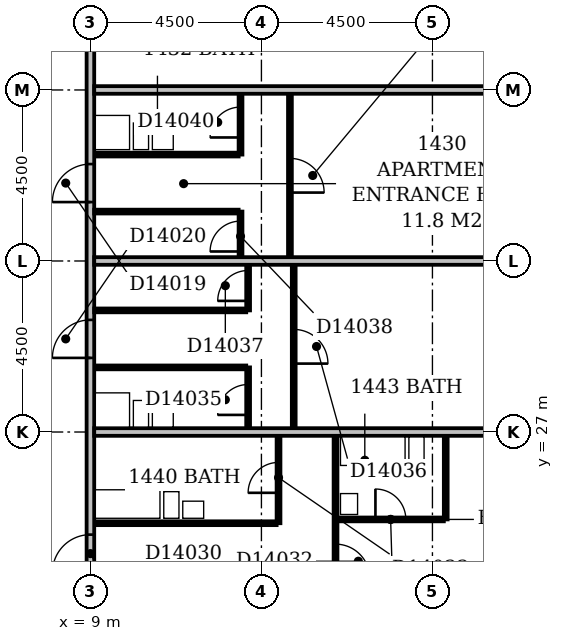
"""IFC4 building model, lengths in metres.
Left out: names, types, materials, properties, quantities, classifications, styles, units other than length and angle.
Written with IfcOpenShell. Run it as: python <this file> out.ifc"""

import sys

from ifc_helpers import new_model, si_unit, direction, frame, frame_2d, origin, place, context, subcontext, project, spatial, rectangle, extrude, element, fill, save


model = new_model("IFC4")
c1 = context("Model", 3, precision=1e-05, world=origin(), true_north=direction((0.0, 1.0)))
c2 = subcontext(c1, "Body", "Model", "MODEL_VIEW")
j1 = project(units=[si_unit("LENGTHUNIT", "METRE"), si_unit("PLANEANGLEUNIT", "RADIAN")], contexts=[c1])
p1 = place(None, origin())
s1 = spatial("IfcSite", under=j1, at=p1, CompositionType="ELEMENT")
p2 = place(p1, origin())
s2 = spatial("IfcBuilding", under=s1, at=p2, CompositionType="ELEMENT")
p3 = place(p2, frame((0.0, 0.0, 61.4)))
s3 = spatial("IfcBuildingStorey", under=s2, at=p3, CompositionType="ELEMENT", Elevation=61.4)
p4 = place(p3, frame((9.0, 5.0, 0.0), z_axis=(0.0, 0.0, 1.0), x_axis=(0.0, 1.0, 0.0)))
e1 = element("IfcWall", 1, at=p4, inside=s3, PredefinedType="PARTITIONING", context=c2, shape_type="SweptSolid", body=[
    extrude(rectangle(XDim=44.5, YDim=0.2, at=frame_2d((22.25, 0.0))), origin(), (0.0, 0.0, 1.0), 3.3),
])
p5 = place(p4, frame((28.05, 0.0, 0.0)))
e2 = element("IfcOpeningElement", 2, at=p5, cuts=e1, PredefinedType="OPENING", context=c2, shape_type="SweptSolid", body=[
    extrude(rectangle(XDim=1.0, YDim=2.1, at=frame_2d((0.5, 1.05))), frame((0.0, 0.112, 0.0), z_axis=(0.0, -1.0, 0.0), x_axis=(1.0, 0.0, 0.0)), (0.0, 0.0, 1.0), 0.224),
])
p6 = place(p4, frame((23.95, 0.0, 0.0)))
e3 = element("IfcOpeningElement", 3, at=p6, cuts=e1, PredefinedType="OPENING", context=c2, shape_type="SweptSolid", body=[
    extrude(rectangle(XDim=1.0, YDim=2.1, at=frame_2d((0.5, 1.05))), frame((0.0, 0.112, 0.0), z_axis=(0.0, -1.0, 0.0), x_axis=(1.0, 0.0, 0.0)), (0.0, 0.0, 1.0), 0.224),
])
p7 = place(p4, frame((18.3, 0.0, 0.0)))
e4 = element("IfcOpeningElement", 4, at=p7, cuts=e1, PredefinedType="OPENING", context=c2, shape_type="SweptSolid", body=[
    extrude(rectangle(XDim=1.0, YDim=2.1, at=frame_2d((0.5, 1.05))), frame((0.0, 0.112, 0.0), z_axis=(0.0, -1.0, 0.0), x_axis=(1.0, 0.0, 0.0)), (0.0, 0.0, 1.0), 0.224),
])
p8 = place(p4, frame((9.3, 0.0, 0.0)))
e5 = element("IfcOpeningElement", 5, at=p8, cuts=e1, PredefinedType="OPENING", context=c2, shape_type="SweptSolid", body=[
    extrude(rectangle(XDim=1.0, YDim=2.1, at=frame_2d((0.5, 1.05))), frame((0.0, 0.112, 0.0), z_axis=(0.0, -1.0, 0.0), x_axis=(1.0, 0.0, 0.0)), (0.0, 0.0, 1.0), 0.224),
])
p9 = place(p4, frame((32.75, 0.0, 0.0)))
e6 = element("IfcOpeningElement", 6, at=p9, cuts=e1, PredefinedType="OPENING", context=c2, shape_type="SweptSolid", body=[
    extrude(rectangle(XDim=0.9, YDim=2.1, at=frame_2d((0.45, 1.05))), frame((0.0, 0.112, 0.0), z_axis=(0.0, -1.0, 0.0), x_axis=(1.0, 0.0, 0.0)), (0.0, 0.0, 1.0), 0.224),
])
p10 = place(p4, frame((1.5, 0.0, 0.0)))
e7 = element("IfcOpeningElement", 7, at=p10, cuts=e1, PredefinedType="OPENING", context=c2, shape_type="SweptSolid", body=[
    extrude(rectangle(XDim=0.9, YDim=2.1, at=frame_2d((0.45, 1.05))), frame((0.0, 0.112, 0.0), z_axis=(0.0, -1.0, 0.0), x_axis=(1.0, 0.0, 0.0)), (0.0, 0.0, 1.0), 0.224),
])
p11 = place(p3, frame((15.45, 18.1, 0.0), z_axis=(0.0, 0.0, 1.0), x_axis=(0.0, 1.0, 0.0)))
e8 = element("IfcWall", 8, at=p11, inside=s3, PredefinedType="PARTITIONING", context=c2, shape_type="SweptSolid", body=[
    extrude(rectangle(XDim=8.8, YDim=0.1, at=frame_2d((4.4, 0.0))), origin(), (0.0, 0.0, 1.0), 3.3),
])
p12 = place(p11, frame((1.7, 0.0, 0.0)))
e9 = element("IfcOpeningElement", 9, at=p12, cuts=e8, PredefinedType="OPENING", context=c2, shape_type="SweptSolid", body=[
    extrude(rectangle(XDim=0.9, YDim=2.1, at=frame_2d((0.45, 1.05))), frame((0.0, 0.062, 0.0), z_axis=(0.0, -1.0, 0.0), x_axis=(1.0, 0.0, 0.0)), (0.0, 0.0, 1.0), 0.124),
])
p13 = place(p11, frame((5.05, 0.0, 0.0)))
e10 = element("IfcOpeningElement", 10, at=p13, cuts=e8, PredefinedType="OPENING", context=c2, shape_type="SweptSolid", body=[
    extrude(rectangle(XDim=0.9, YDim=2.1, at=frame_2d((0.45, 1.05))), frame((0.0, 0.062, 0.0), z_axis=(0.0, -1.0, 0.0), x_axis=(1.0, 0.0, 0.0)), (0.0, 0.0, 1.0), 0.124),
])
p14 = place(p3, frame((9.1, 24.6, 0.0), z_axis=(0.0, 0.0, 1.0), x_axis=(1.0, 0.0, 0.0)))
e11 = element("IfcWall", 11, at=p14, inside=s3, PredefinedType="PLUMBINGWALL", context=c2, shape_type="SweptSolid", body=[
    extrude(rectangle(XDim=4.8, YDim=0.1, at=frame_2d((2.4, 0.0))), origin(), (0.0, 0.0, 1.0), 3.3),
])
p15 = place(p3, frame((13.95, 24.6, 0.0), z_axis=(0.0, 0.0, 1.0), x_axis=(0.0, 1.0, 0.0)))
e12 = element("IfcWall", 12, at=p15, inside=s3, PredefinedType="PARTITIONING", context=c2, shape_type="SweptSolid", body=[
    extrude(rectangle(XDim=2.3, YDim=0.1, at=frame_2d((1.15, 0.0))), origin(), (0.0, 0.0, 1.0), 3.3),
])
p16 = place(p15, frame((0.8, 0.0, 0.0)))
e13 = element("IfcOpeningElement", 13, at=p16, cuts=e12, PredefinedType="OPENING", context=c2, shape_type="SweptSolid", body=[
    extrude(rectangle(XDim=0.8, YDim=2.1, at=frame_2d((0.4, 1.05))), frame((0.0, 0.062, 0.0), z_axis=(0.0, -1.0, 0.0), x_axis=(1.0, 0.0, 0.0)), (0.0, 0.0, 1.0), 0.124),
])
p17 = place(p3, frame((15.5, 24.7, 0.0), z_axis=(0.0, 0.0, 1.0), x_axis=(1.0, 0.0, 0.0)))
e14 = element("IfcWall", 14, at=p17, inside=s3, PredefinedType="PLUMBINGWALL", context=c2, shape_type="SweptSolid", body=[
    extrude(rectangle(XDim=2.8, YDim=0.1, at=frame_2d((1.4, 0.0))), origin(), (0.0, 0.0, 1.0), 3.3),
])
p18 = place(p17, frame((1.0, 0.0, 0.0)))
e15 = element("IfcOpeningElement", 15, at=p18, cuts=e14, PredefinedType="OPENING", context=c2, shape_type="SweptSolid", body=[
    extrude(rectangle(XDim=0.8, YDim=2.1, at=frame_2d((0.4, 1.05))), frame((0.0, 0.062, 0.0), z_axis=(0.0, -1.0, 0.0), x_axis=(1.0, 0.0, 0.0)), (0.0, 0.0, 1.0), 0.124),
])
p19 = place(p3, frame((18.35, 24.7, 0.0), z_axis=(0.0, 0.0, 1.0), x_axis=(0.0, 1.0, 0.0)))
e16 = element("IfcWall", 16, at=p19, inside=s3, PredefinedType="PLUMBINGWALL", context=c2, shape_type="SweptSolid", body=[
    extrude(rectangle(XDim=2.2, YDim=0.1, at=frame_2d((1.1, 0.0))), origin(), (0.0, 0.0, 1.0), 3.3),
])
p20 = place(p3, frame((9.1, 27.0, 0.0), z_axis=(0.0, 0.0, 1.0), x_axis=(1.0, 0.0, 0.0)))
e17 = element("IfcWall", 17, at=p20, inside=s3, PredefinedType="PARTITIONING", context=c2, shape_type="SweptSolid", body=[
    extrude(rectangle(XDim=12.8, YDim=0.2, at=frame_2d((6.4, 0.0))), origin(), (0.0, 0.0, 1.0), 2.7),
])
p21 = place(p3, frame((13.15, 27.1, 0.0), z_axis=(0.0, 0.0, 1.0), x_axis=(0.0, 1.0, 0.0)))
e18 = element("IfcWall", 18, at=p21, inside=s3, PredefinedType="PARTITIONING", context=c2, shape_type="SweptSolid", body=[
    extrude(rectangle(XDim=1.6, YDim=0.1, at=frame_2d((0.8, 0.0))), origin(), (0.0, 0.0, 1.0), 3.3),
])
p22 = place(p21, frame((0.35, 0.0, 0.0)))
e19 = element("IfcOpeningElement", 19, at=p22, cuts=e18, PredefinedType="OPENING", context=c2, shape_type="SweptSolid", body=[
    extrude(rectangle(XDim=0.8, YDim=2.1, at=frame_2d((0.4, 1.05))), frame((0.0, 0.062, 0.0), z_axis=(0.0, -1.0, 0.0), x_axis=(1.0, 0.0, 0.0)), (0.0, 0.0, 1.0), 0.124),
])
p23 = place(p3, frame((14.35, 27.1, 0.0), z_axis=(0.0, 0.0, 1.0), x_axis=(0.0, 1.0, 0.0)))
e20 = element("IfcWall", 20, at=p23, inside=s3, PredefinedType="PARTITIONING", context=c2, shape_type="SweptSolid", body=[
    extrude(rectangle(XDim=4.3, YDim=0.1, at=frame_2d((2.15, 0.0))), origin(), (0.0, 0.0, 1.0), 3.3),
])
p24 = place(p23, frame((1.7, 0.0, 0.0)))
e21 = element("IfcOpeningElement", 21, at=p24, cuts=e20, PredefinedType="OPENING", context=c2, shape_type="SweptSolid", body=[
    extrude(rectangle(XDim=0.9, YDim=2.1, at=frame_2d((0.45, 1.05))), frame((0.0, 0.062, 0.0), z_axis=(0.0, -1.0, 0.0), x_axis=(1.0, 0.0, 0.0)), (0.0, 0.0, 1.0), 0.124),
])
p25 = place(p3, frame((9.1, 28.7, 0.0), z_axis=(0.0, 0.0, 1.0), x_axis=(1.0, 0.0, 0.0)))
e22 = element("IfcWall", 22, at=p25, inside=s3, PredefinedType="PLUMBINGWALL", context=c2, shape_type="SweptSolid", body=[
    extrude(rectangle(XDim=4.0, YDim=0.1, at=frame_2d((2.0, 0.0))), origin(), (0.0, 0.0, 1.0), 3.3),
])
p26 = place(p3, frame((9.1, 30.2, 0.0), z_axis=(0.0, 0.0, 1.0), x_axis=(1.0, 0.0, 0.0)))
e23 = element("IfcWall", 23, at=p26, inside=s3, PredefinedType="PARTITIONING", context=c2, shape_type="SweptSolid", body=[
    extrude(rectangle(XDim=4.0, YDim=0.1, at=frame_2d((2.0, 0.0))), origin(), (0.0, 0.0, 1.0), 3.3),
])
p27 = place(p3, frame((13.15, 30.2, 0.0), z_axis=(0.0, 0.0, 1.0), x_axis=(0.0, 1.0, 0.0)))
e24 = element("IfcWall", 24, at=p27, inside=s3, PredefinedType="PARTITIONING", context=c2, shape_type="SweptSolid", body=[
    extrude(rectangle(XDim=1.2, YDim=0.1, at=frame_2d((0.6, 0.0))), origin(), (0.0, 0.0, 1.0), 3.3),
])
p28 = place(p27, frame((0.25, 0.0, 0.0)))
e25 = element("IfcOpeningElement", 25, at=p28, cuts=e24, PredefinedType="OPENING", context=c2, shape_type="SweptSolid", body=[
    extrude(rectangle(XDim=0.8, YDim=2.1, at=frame_2d((0.4, 1.05))), frame((0.0, 0.062, 0.0), z_axis=(0.0, -1.0, 0.0), x_axis=(1.0, 0.0, 0.0)), (0.0, 0.0, 1.0), 0.124),
])
p29 = place(p3, frame((9.1, 31.5, 0.0), z_axis=(0.0, 0.0, 1.0), x_axis=(1.0, 0.0, 0.0)))
e26 = element("IfcWall", 26, at=p29, inside=s3, PredefinedType="PARTITIONING", context=c2, shape_type="SweptSolid", body=[
    extrude(rectangle(XDim=12.8, YDim=0.2, at=frame_2d((6.4, 0.0))), origin(), (0.0, 0.0, 1.0), 3.3),
])
p30 = place(p3, frame((12.95, 31.6, 0.0), z_axis=(0.0, 0.0, 1.0), x_axis=(0.0, 1.0, 0.0)))
e27 = element("IfcWall", 27, at=p30, inside=s3, PredefinedType="PARTITIONING", context=c2, shape_type="SweptSolid", body=[
    extrude(rectangle(XDim=1.2, YDim=0.1, at=frame_2d((0.6, 0.0))), origin(), (0.0, 0.0, 1.0), 3.3),
])
p31 = place(p30, frame((0.15, 0.0, 0.0)))
e28 = element("IfcOpeningElement", 28, at=p31, cuts=e27, PredefinedType="OPENING", context=c2, shape_type="SweptSolid", body=[
    extrude(rectangle(XDim=0.8, YDim=2.1, at=frame_2d((0.4, 1.05))), frame((0.0, 0.062, 0.0), z_axis=(0.0, -1.0, 0.0), x_axis=(1.0, 0.0, 0.0)), (0.0, 0.0, 1.0), 0.124),
])
p32 = place(p3, frame((14.25, 31.6, 0.0), z_axis=(0.0, 0.0, 1.0), x_axis=(0.0, 1.0, 0.0)))
e29 = element("IfcWall", 29, at=p32, inside=s3, PredefinedType="PARTITIONING", context=c2, shape_type="SweptSolid", body=[
    extrude(rectangle(XDim=4.3, YDim=0.1, at=frame_2d((2.15, 0.0))), origin(), (0.0, 0.0, 1.0), 3.3),
])
p33 = place(p32, frame((1.7, 0.0, 0.0)))
e30 = element("IfcOpeningElement", 30, at=p33, cuts=e29, PredefinedType="OPENING", context=c2, shape_type="SweptSolid", body=[
    extrude(rectangle(XDim=0.9, YDim=2.1, at=frame_2d((0.45, 1.05))), frame((0.0, 0.062, 0.0), z_axis=(0.0, -1.0, 0.0), x_axis=(1.0, 0.0, 0.0)), (0.0, 0.0, 1.0), 0.124),
])
p34 = place(p3, frame((9.1, 32.8, 0.0), z_axis=(0.0, 0.0, 1.0), x_axis=(1.0, 0.0, 0.0)))
e31 = element("IfcWall", 31, at=p34, inside=s3, PredefinedType="PARTITIONING", context=c2, shape_type="SweptSolid", body=[
    extrude(rectangle(XDim=3.8, YDim=0.1, at=frame_2d((1.9, 0.0))), origin(), (0.0, 0.0, 1.0), 3.3),
])
p35 = place(p3, frame((9.1, 34.3, 0.0), z_axis=(0.0, 0.0, 1.0), x_axis=(1.0, 0.0, 0.0)))
e32 = element("IfcWall", 32, at=p35, inside=s3, PredefinedType="PLUMBINGWALL", context=c2, shape_type="SweptSolid", body=[
    extrude(rectangle(XDim=3.8, YDim=0.1, at=frame_2d((1.9, 0.0))), origin(), (0.0, 0.0, 1.0), 3.3),
])
p36 = place(p3, frame((12.95, 34.3, 0.0), z_axis=(0.0, 0.0, 1.0), x_axis=(0.0, 1.0, 0.0)))
e33 = element("IfcWall", 33, at=p36, inside=s3, PredefinedType="PARTITIONING", context=c2, shape_type="SweptSolid", body=[
    extrude(rectangle(XDim=1.6, YDim=0.1, at=frame_2d((0.8, 0.0))), origin(), (0.0, 0.0, 1.0), 3.3),
])
p37 = place(p36, frame((0.45, 0.0, 0.0)))
e34 = element("IfcOpeningElement", 34, at=p37, cuts=e33, PredefinedType="OPENING", context=c2, shape_type="SweptSolid", body=[
    extrude(rectangle(XDim=0.8, YDim=2.1, at=frame_2d((0.4, 1.05))), frame((0.0, 0.062, 0.0), z_axis=(0.0, -1.0, 0.0), x_axis=(1.0, 0.0, 0.0)), (0.0, 0.0, 1.0), 0.124),
])
p38 = place(p3, frame((9.1, 36.0, 0.0), z_axis=(0.0, 0.0, 1.0), x_axis=(1.0, 0.0, 0.0)))
e35 = element("IfcWall", 35, at=p38, inside=s3, PredefinedType="PARTITIONING", context=c2, shape_type="SweptSolid", body=[
    extrude(rectangle(XDim=12.8, YDim=0.2, at=frame_2d((6.4, 0.0))), origin(), (0.0, 0.0, 1.0), 2.4),
])
p39 = place(p5, origin())
e36 = element("IfcDoor", 36, at=p39, inside=s3, OperationType="SINGLE_SWING_LEFT", PredefinedType="DOOR", context=c2, shape_type="SweptSolid", body=[
    extrude(rectangle(XDim=1.0, YDim=2.1, at=frame_2d((0.5, 1.05))), frame((0.0, 0.025, 0.0), z_axis=(0.0, -1.0, 0.0), x_axis=(1.0, 0.0, 0.0)), (0.0, 0.0, 1.0), 0.05),
])
fill(e2, e36)
p40 = place(p6, origin())
e37 = element("IfcDoor", 37, at=p40, inside=s3, OperationType="SINGLE_SWING_LEFT", PredefinedType="DOOR", context=c2, shape_type="SweptSolid", body=[
    extrude(rectangle(XDim=1.0, YDim=2.1, at=frame_2d((0.5, 1.05))), frame((0.0, 0.025, 0.0), z_axis=(0.0, -1.0, 0.0), x_axis=(1.0, 0.0, 0.0)), (0.0, 0.0, 1.0), 0.05),
])
fill(e3, e37)
p41 = place(p7, origin())
e38 = element("IfcDoor", 38, at=p41, inside=s3, OperationType="SINGLE_SWING_LEFT", PredefinedType="DOOR", context=c2, shape_type="SweptSolid", body=[
    extrude(rectangle(XDim=1.0, YDim=2.1, at=frame_2d((0.5, 1.05))), frame((0.0, 0.025, 0.0), z_axis=(0.0, -1.0, 0.0), x_axis=(1.0, 0.0, 0.0)), (0.0, 0.0, 1.0), 0.05),
])
fill(e4, e38)
p42 = place(p13, frame((0.9, 0.0, 0.0), z_axis=(0.0, 0.0, 1.0), x_axis=(-1.0, 0.0, 0.0)))
e39 = element("IfcDoor", 39, at=p42, inside=s3, OperationType="SINGLE_SWING_RIGHT", PredefinedType="DOOR", context=c2, shape_type="SweptSolid", body=[
    extrude(rectangle(XDim=0.9, YDim=2.1, at=frame_2d((0.45, 1.05))), frame((0.0, 0.025, 0.0), z_axis=(0.0, -1.0, 0.0), x_axis=(1.0, 0.0, 0.0)), (0.0, 0.0, 1.0), 0.05),
])
fill(e10, e39)
p43 = place(p16, origin())
e40 = element("IfcDoor", 40, at=p43, inside=s3, OperationType="SINGLE_SWING_LEFT", PredefinedType="DOOR", context=c2, shape_type="SweptSolid", body=[
    extrude(rectangle(XDim=0.8, YDim=2.1, at=frame_2d((0.4, 1.05))), frame((0.0, 0.025, 0.0), z_axis=(0.0, -1.0, 0.0), x_axis=(1.0, 0.0, 0.0)), (0.0, 0.0, 1.0), 0.05),
])
fill(e13, e40)
p44 = place(p18, origin())
e41 = element("IfcDoor", 41, at=p44, inside=s3, OperationType="SINGLE_SWING_LEFT", PredefinedType="DOOR", context=c2, shape_type="SweptSolid", body=[
    extrude(rectangle(XDim=0.8, YDim=2.1, at=frame_2d((0.4, 1.05))), frame((0.0, 0.025, 0.0), z_axis=(0.0, -1.0, 0.0), x_axis=(1.0, 0.0, 0.0)), (0.0, 0.0, 1.0), 0.05),
])
fill(e15, e41)
p45 = place(p22, origin())
e42 = element("IfcDoor", 42, at=p45, inside=s3, OperationType="SINGLE_SWING_LEFT", PredefinedType="DOOR", context=c2, shape_type="SweptSolid", body=[
    extrude(rectangle(XDim=0.8, YDim=2.1, at=frame_2d((0.4, 1.05))), frame((0.0, 0.025, 0.0), z_axis=(0.0, -1.0, 0.0), x_axis=(1.0, 0.0, 0.0)), (0.0, 0.0, 1.0), 0.05),
])
fill(e19, e42)
p46 = place(p24, frame((0.9, 0.0, 0.0), z_axis=(0.0, 0.0, 1.0), x_axis=(-1.0, 0.0, 0.0)))
e43 = element("IfcDoor", 43, at=p46, inside=s3, OperationType="SINGLE_SWING_RIGHT", PredefinedType="DOOR", context=c2, shape_type="SweptSolid", body=[
    extrude(rectangle(XDim=0.9, YDim=2.1, at=frame_2d((0.45, 1.05))), frame((0.0, 0.025, 0.0), z_axis=(0.0, -1.0, 0.0), x_axis=(1.0, 0.0, 0.0)), (0.0, 0.0, 1.0), 0.05),
])
fill(e21, e43)
p47 = place(p28, origin())
e44 = element("IfcDoor", 44, at=p47, inside=s3, OperationType="SINGLE_SWING_LEFT", PredefinedType="DOOR", context=c2, shape_type="SweptSolid", body=[
    extrude(rectangle(XDim=0.8, YDim=2.1, at=frame_2d((0.4, 1.05))), frame((0.0, 0.025, 0.0), z_axis=(0.0, -1.0, 0.0), x_axis=(1.0, 0.0, 0.0)), (0.0, 0.0, 1.0), 0.05),
])
fill(e25, e44)
p48 = place(p31, origin())
e45 = element("IfcDoor", 45, at=p48, inside=s3, OperationType="SINGLE_SWING_LEFT", PredefinedType="DOOR", context=c2, shape_type="SweptSolid", body=[
    extrude(rectangle(XDim=0.8, YDim=2.1, at=frame_2d((0.4, 1.05))), frame((0.0, 0.025, 0.0), z_axis=(0.0, -1.0, 0.0), x_axis=(1.0, 0.0, 0.0)), (0.0, 0.0, 1.0), 0.05),
])
fill(e28, e45)
p49 = place(p33, frame((0.9, 0.0, 0.0), z_axis=(0.0, 0.0, 1.0), x_axis=(-1.0, 0.0, 0.0)))
e46 = element("IfcDoor", 46, at=p49, inside=s3, OperationType="SINGLE_SWING_RIGHT", PredefinedType="DOOR", context=c2, shape_type="SweptSolid", body=[
    extrude(rectangle(XDim=0.9, YDim=2.1, at=frame_2d((0.45, 1.05))), frame((0.0, 0.025, 0.0), z_axis=(0.0, -1.0, 0.0), x_axis=(1.0, 0.0, 0.0)), (0.0, 0.0, 1.0), 0.05),
])
fill(e30, e46)
p50 = place(p37, origin())
e47 = element("IfcDoor", 47, at=p50, inside=s3, OperationType="SINGLE_SWING_LEFT", PredefinedType="DOOR", context=c2, shape_type="SweptSolid", body=[
    extrude(rectangle(XDim=0.8, YDim=2.1, at=frame_2d((0.4, 1.05))), frame((0.0, 0.025, 0.0), z_axis=(0.0, -1.0, 0.0), x_axis=(1.0, 0.0, 0.0)), (0.0, 0.0, 1.0), 0.05),
])
fill(e34, e47)
save(model, sys.argv[1])
